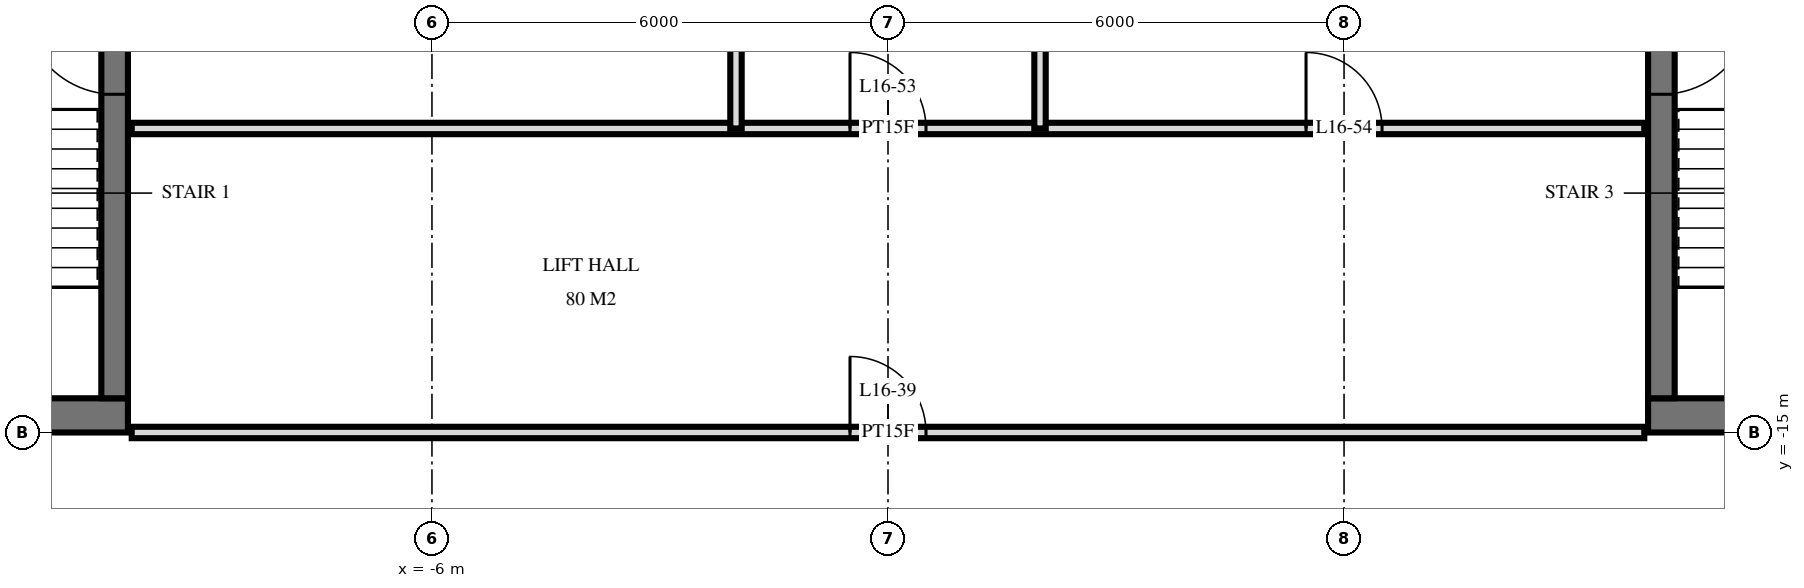
"""IFC4 building model, lengths in metres.
Left out: names, types, materials, properties, quantities, classifications, styles, units other than length and angle.
Written with IfcOpenShell. Run it as: python <this file> out.ifc"""

import sys

from ifc_helpers import new_model, si_unit, direction, frame, frame_2d, origin, place, context, subcontext, project, spatial, rectangle, extrude, element, fill, save


model = new_model("IFC4")
c1 = context("Model", 3, precision=1e-05, world=origin(), true_north=direction((0.0, 1.0)))
c2 = subcontext(c1, "Body", "Model", "MODEL_VIEW")
j1 = project(units=[si_unit("LENGTHUNIT", "METRE"), si_unit("PLANEANGLEUNIT", "RADIAN")], contexts=[c1])
p1 = place(None, origin())
s1 = spatial("IfcSite", under=j1, at=p1, CompositionType="ELEMENT")
p2 = place(p1, origin())
s2 = spatial("IfcBuilding", under=s1, at=p2, CompositionType="ELEMENT")
p3 = place(p2, frame((0.0, 0.0, 67.2)))
s3 = spatial("IfcBuildingStorey", under=s2, at=p3, CompositionType="ELEMENT", Elevation=67.2)
p4 = place(p3, frame((-29.5, -14.775, 0.0), z_axis=(0.0, 0.0, 1.0), x_axis=(1.0, 0.0, 0.0)))
e1 = element("IfcWall", 1, at=p4, inside=s3, PredefinedType="SHEAR", context=c2, shape_type="SweptSolid", body=[
    extrude(rectangle(XDim=19.5, YDim=0.45, at=frame_2d((9.75, 0.0))), origin(), (0.0, 0.0, 1.0), 3.6),
])
p5 = place(p4, frame((11.2, 0.0, 0.0)))
e2 = element("IfcOpeningElement", 2, at=p5, cuts=e1, PredefinedType="OPENING", context=c2, shape_type="SweptSolid", body=[
    extrude(rectangle(XDim=1.2, YDim=2.1, at=frame_2d((0.6, 1.05))), frame((0.0, 0.235, 0.0), z_axis=(0.0, -1.0, 0.0), x_axis=(1.0, 0.0, 0.0)), (0.0, 0.0, 1.0), 0.47),
])
p6 = place(p4, frame((14.25, 0.0, 0.0)))
e3 = element("IfcOpeningElement", 3, at=p6, cuts=e1, PredefinedType="OPENING", context=c2, shape_type="SweptSolid", body=[
    extrude(rectangle(XDim=1.1, YDim=2.1, at=frame_2d((0.55, 1.05))), frame((0.0, 0.235, 0.0), z_axis=(0.0, -1.0, 0.0), x_axis=(1.0, 0.0, 0.0)), (0.0, 0.0, 1.0), 0.47),
])
p7 = place(p4, frame((8.5, 0.0, 0.0)))
e4 = element("IfcOpeningElement", 4, at=p7, cuts=e1, PredefinedType="OPENING", context=c2, shape_type="SweptSolid", body=[
    extrude(rectangle(XDim=0.9, YDim=2.1, at=frame_2d((0.45, 1.05))), frame((0.0, 0.235, 0.0), z_axis=(0.0, -1.0, 0.0), x_axis=(1.0, 0.0, 0.0)), (0.0, 0.0, 1.0), 0.47),
])
p8 = place(p4, frame((6.05, 0.0, 0.0)))
e5 = element("IfcOpeningElement", 5, at=p8, cuts=e1, PredefinedType="OPENING", context=c2, shape_type="SweptSolid", body=[
    extrude(rectangle(XDim=1.0, YDim=2.1, at=frame_2d((0.5, 1.05))), frame((0.0, 0.235, 0.0), z_axis=(0.0, -1.0, 0.0), x_axis=(1.0, 0.0, 0.0)), (0.0, 0.0, 1.0), 0.47),
])
p9 = place(p4, frame((2.25, 0.0, 0.0)))
e6 = element("IfcOpeningElement", 6, at=p9, cuts=e1, PredefinedType="OPENING", context=c2, shape_type="SweptSolid", body=[
    extrude(rectangle(XDim=1.0, YDim=2.1, at=frame_2d((0.5, 1.05))), frame((0.0, 0.235, 0.0), z_axis=(0.0, -1.0, 0.0), x_axis=(1.0, 0.0, 0.0)), (0.0, 0.0, 1.0), 0.47),
])
p10 = place(p3, frame((-10.175, -14.55, 0.0), z_axis=(0.0, 0.0, 1.0), x_axis=(0.0, 1.0, 0.0)))
e7 = element("IfcWall", 7, at=p10, inside=s3, PredefinedType="SHEAR", context=c2, shape_type="SweptSolid", body=[
    extrude(rectangle(XDim=14.1, YDim=0.35, at=frame_2d((7.05, 0.0))), origin(), (0.0, 0.0, 1.0), 3.6),
])
p11 = place(p10, frame((8.4, 0.0, 0.0)))
e8 = element("IfcOpeningElement", 8, at=p11, cuts=e7, PredefinedType="OPENING", context=c2, shape_type="SweptSolid", body=[
    extrude(rectangle(XDim=1.4, YDim=2.4, at=frame_2d((0.7, 1.2))), frame((0.0, 0.185, 0.0), z_axis=(0.0, -1.0, 0.0), x_axis=(1.0, 0.0, 0.0)), (0.0, 0.0, 1.0), 0.37),
])
p12 = place(p10, frame((10.0, 0.0, 0.0)))
e9 = element("IfcOpeningElement", 9, at=p12, cuts=e7, PredefinedType="OPENING", context=c2, shape_type="SweptSolid", body=[
    extrude(rectangle(XDim=1.4, YDim=2.4, at=frame_2d((0.7, 1.2))), frame((0.0, 0.185, 0.0), z_axis=(0.0, -1.0, 0.0), x_axis=(1.0, 0.0, 0.0)), (0.0, 0.0, 1.0), 0.37),
])
p13 = place(p10, frame((4.0, 0.0, 0.0)))
e10 = element("IfcOpeningElement", 10, at=p13, cuts=e7, PredefinedType="OPENING", context=c2, shape_type="SweptSolid", body=[
    extrude(rectangle(XDim=1.2, YDim=2.1, at=frame_2d((0.6, 1.05))), frame((0.0, 0.185, 0.0), z_axis=(0.0, -1.0, 0.0), x_axis=(1.0, 0.0, 0.0)), (0.0, 0.0, 1.0), 0.37),
])
p14 = place(p3, frame((10.0, -14.775, 0.0), z_axis=(0.0, 0.0, 1.0), x_axis=(1.0, 0.0, 0.0)))
e11 = element("IfcWall", 11, at=p14, inside=s3, PredefinedType="SHEAR", context=c2, shape_type="SweptSolid", body=[
    extrude(rectangle(XDim=19.5, YDim=0.45, at=frame_2d((9.75, 0.0))), origin(), (0.0, 0.0, 1.0), 3.6),
])
p15 = place(p14, frame((7.1, 0.0, 0.0)))
e12 = element("IfcOpeningElement", 12, at=p15, cuts=e11, PredefinedType="OPENING", context=c2, shape_type="SweptSolid", body=[
    extrude(rectangle(XDim=1.2, YDim=2.1, at=frame_2d((0.6, 1.05))), frame((0.0, 0.235, 0.0), z_axis=(0.0, -1.0, 0.0), x_axis=(1.0, 0.0, 0.0)), (0.0, 0.0, 1.0), 0.47),
])
p16 = place(p14, frame((4.15, 0.0, 0.0)))
e13 = element("IfcOpeningElement", 13, at=p16, cuts=e11, PredefinedType="OPENING", context=c2, shape_type="SweptSolid", body=[
    extrude(rectangle(XDim=1.1, YDim=2.1, at=frame_2d((0.55, 1.05))), frame((0.0, 0.235, 0.0), z_axis=(0.0, -1.0, 0.0), x_axis=(1.0, 0.0, 0.0)), (0.0, 0.0, 1.0), 0.47),
])
p17 = place(p14, frame((10.1, 0.0, 0.0)))
e14 = element("IfcOpeningElement", 14, at=p17, cuts=e11, PredefinedType="OPENING", context=c2, shape_type="SweptSolid", body=[
    extrude(rectangle(XDim=0.9, YDim=2.1, at=frame_2d((0.45, 1.05))), frame((0.0, 0.235, 0.0), z_axis=(0.0, -1.0, 0.0), x_axis=(1.0, 0.0, 0.0)), (0.0, 0.0, 1.0), 0.47),
])
p18 = place(p14, frame((12.45, 0.0, 0.0)))
e15 = element("IfcOpeningElement", 15, at=p18, cuts=e11, PredefinedType="OPENING", context=c2, shape_type="SweptSolid", body=[
    extrude(rectangle(XDim=1.0, YDim=2.1, at=frame_2d((0.5, 1.05))), frame((0.0, 0.235, 0.0), z_axis=(0.0, -1.0, 0.0), x_axis=(1.0, 0.0, 0.0)), (0.0, 0.0, 1.0), 0.47),
])
p19 = place(p14, frame((16.25, 0.0, 0.0)))
e16 = element("IfcOpeningElement", 16, at=p19, cuts=e11, PredefinedType="OPENING", context=c2, shape_type="SweptSolid", body=[
    extrude(rectangle(XDim=1.0, YDim=2.1, at=frame_2d((0.5, 1.05))), frame((0.0, 0.235, 0.0), z_axis=(0.0, -1.0, 0.0), x_axis=(1.0, 0.0, 0.0)), (0.0, 0.0, 1.0), 0.47),
])
p20 = place(p3, frame((10.175, -14.55, 0.0), z_axis=(0.0, 0.0, 1.0), x_axis=(0.0, 1.0, 0.0)))
e17 = element("IfcWall", 17, at=p20, inside=s3, PredefinedType="SHEAR", context=c2, shape_type="SweptSolid", body=[
    extrude(rectangle(XDim=14.1, YDim=0.35, at=frame_2d((7.05, 0.0))), origin(), (0.0, 0.0, 1.0), 3.6),
])
p21 = place(p20, frame((8.4, 0.0, 0.0)))
e18 = element("IfcOpeningElement", 18, at=p21, cuts=e17, PredefinedType="OPENING", context=c2, shape_type="SweptSolid", body=[
    extrude(rectangle(XDim=1.4, YDim=2.4, at=frame_2d((0.7, 1.2))), frame((0.0, 0.185, 0.0), z_axis=(0.0, -1.0, 0.0), x_axis=(1.0, 0.0, 0.0)), (0.0, 0.0, 1.0), 0.37),
])
p22 = place(p20, frame((10.0, 0.0, 0.0)))
e19 = element("IfcOpeningElement", 19, at=p22, cuts=e17, PredefinedType="OPENING", context=c2, shape_type="SweptSolid", body=[
    extrude(rectangle(XDim=1.4, YDim=2.4, at=frame_2d((0.7, 1.2))), frame((0.0, 0.185, 0.0), z_axis=(0.0, -1.0, 0.0), x_axis=(1.0, 0.0, 0.0)), (0.0, 0.0, 1.0), 0.37),
])
p23 = place(p20, frame((4.0, 0.0, 0.0)))
e20 = element("IfcOpeningElement", 20, at=p23, cuts=e17, PredefinedType="OPENING", context=c2, shape_type="SweptSolid", body=[
    extrude(rectangle(XDim=1.2, YDim=2.1, at=frame_2d((0.6, 1.05))), frame((0.0, 0.185, 0.0), z_axis=(0.0, -1.0, 0.0), x_axis=(1.0, 0.0, 0.0)), (0.0, 0.0, 1.0), 0.37),
])
for number, where, z_axis, x_axis in (
    (21, (2.0, -11.0, 0.0), (0.0, 0.0, 1.0), (0.0, 1.0, 0.0)),
    (22, (-2.0, -11.0, 0.0), (0.0, 0.0, 1.0), (0.0, 1.0, 0.0)),
):
    element("IfcWall", number, at=place(p3, frame(where, z_axis=z_axis, x_axis=x_axis)), inside=s3, PredefinedType="PARTITIONING", context=c2, shape_type="SweptSolid", body=[
        extrude(rectangle(XDim=4.0, YDim=0.15, at=frame_2d((2.0, 0.0))), origin(), (0.0, 0.0, 1.0), 3.32),
    ])
p24 = place(p3, frame((-9.95, -15.0, 0.0), z_axis=(0.0, 0.0, 1.0), x_axis=(1.0, 0.0, 0.0)))
e23 = element("IfcWall", 23, at=p24, inside=s3, PredefinedType="PARTITIONING", context=c2, shape_type="SweptSolid", body=[
    extrude(rectangle(XDim=19.9, YDim=0.15, at=frame_2d((9.95, 0.0))), origin(), (0.0, 0.0, 1.0), 2.684),
])
p25 = place(p24, frame((9.45, 0.0, 0.0)))
e24 = element("IfcOpeningElement", 24, at=p25, cuts=e23, PredefinedType="OPENING", context=c2, shape_type="SweptSolid", body=[
    extrude(rectangle(XDim=1.0, YDim=2.1, at=frame_2d((0.5, 1.05))), frame((0.0, 0.085, 0.0), z_axis=(0.0, -1.0, 0.0), x_axis=(1.0, 0.0, 0.0)), (0.0, 0.0, 1.0), 0.17),
])
p26 = place(p3, frame((-9.95, -11.0, 0.0), z_axis=(0.0, 0.0, 1.0), x_axis=(1.0, 0.0, 0.0)))
e25 = element("IfcWall", 25, at=p26, inside=s3, PredefinedType="PARTITIONING", context=c2, shape_type="SweptSolid", body=[
    extrude(rectangle(XDim=19.9, YDim=0.15, at=frame_2d((9.95, 0.0))), origin(), (0.0, 0.0, 1.0), 3.32),
])
p27 = place(p26, frame((9.45, 0.0, 0.0)))
e26 = element("IfcOpeningElement", 26, at=p27, cuts=e25, PredefinedType="OPENING", context=c2, shape_type="SweptSolid", body=[
    extrude(rectangle(XDim=1.0, YDim=2.1, at=frame_2d((0.5, 1.05))), frame((0.0, 0.085, 0.0), z_axis=(0.0, -1.0, 0.0), x_axis=(1.0, 0.0, 0.0)), (0.0, 0.0, 1.0), 0.17),
])
p28 = place(p26, frame((15.45, 0.0, 0.0)))
e27 = element("IfcOpeningElement", 27, at=p28, cuts=e25, PredefinedType="OPENING", context=c2, shape_type="SweptSolid", body=[
    extrude(rectangle(XDim=1.0, YDim=2.1, at=frame_2d((0.5, 1.05))), frame((0.0, 0.085, 0.0), z_axis=(0.0, -1.0, 0.0), x_axis=(1.0, 0.0, 0.0)), (0.0, 0.0, 1.0), 0.17),
])
p29 = place(p13, origin())
e28 = element("IfcDoor", 28, at=p29, inside=s3, OperationType="SINGLE_SWING_LEFT", PredefinedType="DOOR", context=c2, shape_type="SweptSolid", body=[
    extrude(rectangle(XDim=1.2, YDim=2.1, at=frame_2d((0.6, 1.05))), frame((0.0, 0.025, 0.0), z_axis=(0.0, -1.0, 0.0), x_axis=(1.0, 0.0, 0.0)), (0.0, 0.0, 1.0), 0.05),
])
fill(e10, e28)
p30 = place(p23, frame((0.6, 0.0, 0.0), z_axis=(0.0, 0.0, 1.0), x_axis=(-1.0, 0.0, 0.0)))
e29 = element("IfcDoor", 29, at=p30, inside=s3, OperationType="SINGLE_SWING_RIGHT", PredefinedType="DOOR", context=c2, shape_type="SweptSolid", body=[
    extrude(rectangle(XDim=1.2, YDim=2.1, at=frame_2d((0.0, 1.05))), frame((0.0, -0.025, 0.0), z_axis=(0.0, 1.0, 0.0), x_axis=(-1.0, 0.0, 0.0)), (0.0, 0.0, 1.0), 0.05),
])
fill(e20, e29)
p31 = place(p25, origin())
e30 = element("IfcDoor", 30, at=p31, inside=s3, OperationType="SINGLE_SWING_RIGHT", PredefinedType="DOOR", context=c2, shape_type="SweptSolid", body=[
    extrude(rectangle(XDim=1.0, YDim=2.1, at=frame_2d((0.5, 1.05))), frame((0.0, 0.025, 0.0), z_axis=(0.0, -1.0, 0.0), x_axis=(1.0, 0.0, 0.0)), (0.0, 0.0, 1.0), 0.05),
])
fill(e24, e30)
p32 = place(p27, origin())
e31 = element("IfcDoor", 31, at=p32, inside=s3, OperationType="SINGLE_SWING_RIGHT", PredefinedType="DOOR", context=c2, shape_type="SweptSolid", body=[
    extrude(rectangle(XDim=1.0, YDim=2.1, at=frame_2d((0.5, 1.05))), frame((0.0, 0.025, 0.0), z_axis=(0.0, -1.0, 0.0), x_axis=(1.0, 0.0, 0.0)), (0.0, 0.0, 1.0), 0.05),
])
fill(e26, e31)
p33 = place(p28, origin())
e32 = element("IfcDoor", 32, at=p33, inside=s3, OperationType="SINGLE_SWING_RIGHT", PredefinedType="DOOR", context=c2, shape_type="SweptSolid", body=[
    extrude(rectangle(XDim=1.0, YDim=2.1, at=frame_2d((0.5, 1.05))), frame((0.0, 0.025, 0.0), z_axis=(0.0, -1.0, 0.0), x_axis=(1.0, 0.0, 0.0)), (0.0, 0.0, 1.0), 0.05),
])
fill(e27, e32)
save(model, sys.argv[1])
